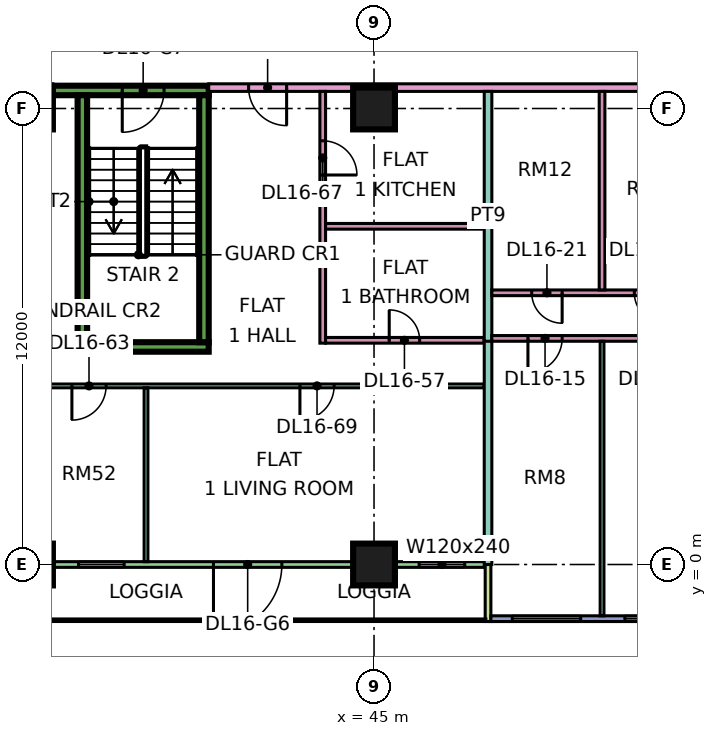
"""IFC4 building model, lengths in metres.
Left out: names, types, materials, properties, quantities, classifications, styles, units other than length and angle.
Written with IfcOpenShell. Run it as: python <this file> out.ifc"""

import sys

from ifc_helpers import new_model, si_unit, direction, frame, frame_2d, origin, origin_2d, place, context, subcontext, project, spatial, rectangle, extrude, element, fill, save


model = new_model("IFC4")
c1 = context("Model", 3, precision=1e-05, world=origin(), true_north=direction((0.0, 1.0)))
c2 = subcontext(c1, "Body", "Model", "MODEL_VIEW")
j1 = project(units=[si_unit("LENGTHUNIT", "METRE"), si_unit("PLANEANGLEUNIT", "RADIAN")], contexts=[c1])
p1 = place(None, origin())
s1 = spatial("IfcSite", under=j1, at=p1, CompositionType="ELEMENT")
p2 = place(p1, origin())
s2 = spatial("IfcBuilding", under=s1, at=p2, CompositionType="ELEMENT")
p3 = place(p2, frame((0.0, 0.0, 75.15)))
s3 = spatial("IfcBuildingStorey", under=s2, at=p3, CompositionType="ELEMENT", Elevation=75.15)
for number, where, z_axis, x_axis in (
    (1, (36.0, 0.0, 0.0), (0.0, 0.0, 1.0), (1.0, 0.0, 0.0)),
    (2, (36.0, 12.0, 0.0), (0.0, 0.0, 1.0), (1.0, 0.0, 0.0)),
    (3, (45.0, 0.0, 0.0), (0.0, 0.0, 1.0), (1.0, 0.0, 0.0)),
    (4, (45.0, 12.0, 0.0), (0.0, 0.0, 1.0), (1.0, 0.0, 0.0)),
):
    element("IfcColumn", number, at=place(p3, frame(where, z_axis=z_axis, x_axis=x_axis)), inside=s3, PredefinedType="COLUMN", context=c2, shape_type="SweptSolid", body=[
        extrude(rectangle(XDim=1.1, YDim=1.1, at=origin_2d()), origin(), (0.0, 0.0, 1.0), 3.75),
    ])
p4 = place(p3, frame((37.2, 5.725, 0.0), z_axis=(0.0, 0.0, 1.0), x_axis=(1.0, 0.0, 0.0)))
e5 = element("IfcWall", 5, at=p4, inside=s3, PredefinedType="SHEAR", context=c2, shape_type="SweptSolid", body=[
    extrude(rectangle(XDim=3.45, YDim=0.25, at=frame_2d((1.725, 0.0))), origin(), (0.0, 0.0, 1.0), 3.75),
])
p5 = place(p3, frame((36.55, 12.475, 0.0), z_axis=(0.0, 0.0, 1.0), x_axis=(1.0, 0.0, 0.0)))
e6 = element("IfcWall", 6, at=p5, inside=s3, PredefinedType="SHEAR", context=c2, shape_type="SweptSolid", body=[
    extrude(rectangle(XDim=4.1, YDim=0.25, at=frame_2d((2.05, 0.0))), origin(), (0.0, 0.0, 1.0), 3.75),
])
p6 = place(p5, frame((1.825, 0.0, 0.0)))
e7 = element("IfcOpeningElement", 7, at=p6, cuts=e6, PredefinedType="OPENING", context=c2, shape_type="SweptSolid", body=[
    extrude(rectangle(XDim=1.1, YDim=2.2, at=frame_2d((0.55, 1.1))), frame((0.0, 0.135, 0.0), z_axis=(0.0, -1.0, 0.0), x_axis=(1.0, 0.0, 0.0)), (0.0, 0.0, 1.0), 0.27),
])
for number, where, z_axis, x_axis in (
    (8, (37.325, 5.85, 0.0), (0.0, 0.0, 1.0), (0.0, 1.0, 0.0)),
    (9, (40.525, 5.85, 0.0), (0.0, 0.0, 1.0), (0.0, 1.0, 0.0)),
):
    element("IfcWall", number, at=place(p3, frame(where, z_axis=z_axis, x_axis=x_axis)), inside=s3, PredefinedType="SHEAR", context=c2, shape_type="SweptSolid", body=[
        extrude(rectangle(XDim=6.5, YDim=0.25, at=frame_2d((3.25, 0.0))), origin(), (0.0, 0.0, 1.0), 3.75),
    ])
p7 = place(p3, frame((36.075, 0.0, 0.0), z_axis=(0.0, 0.0, 1.0), x_axis=(1.0, 0.0, 0.0)))
e10 = element("IfcWall", 10, at=p7, inside=s3, PredefinedType="SOLIDWALL", context=c2, shape_type="SweptSolid", body=[
    extrude(rectangle(XDim=11.85, YDim=0.15, at=frame_2d((5.925, 0.0))), origin(), (0.0, 0.0, 1.0), 3.35),
])
p8 = place(p7, frame((1.15, 0.0, 0.45)))
e11 = element("IfcOpeningElement", 11, at=p8, cuts=e10, PredefinedType="OPENING", context=c2, shape_type="SweptSolid", body=[
    extrude(rectangle(XDim=1.2, YDim=2.4, at=frame_2d((0.6, 1.2))), frame((0.0, 0.085, 0.0), z_axis=(0.0, -1.0, 0.0), x_axis=(1.0, 0.0, 0.0)), (0.0, 0.0, 1.0), 0.17),
])
p9 = place(p7, frame((4.7, 0.0, 0.0)))
e12 = element("IfcOpeningElement", 12, at=p9, cuts=e10, PredefinedType="OPENING", context=c2, shape_type="SweptSolid", body=[
    extrude(rectangle(XDim=1.8, YDim=2.4, at=frame_2d((0.9, 1.2))), frame((0.0, 0.085, 0.0), z_axis=(0.0, -1.0, 0.0), x_axis=(1.0, 0.0, 0.0)), (0.0, 0.0, 1.0), 0.17),
])
p10 = place(p7, frame((10.113, 0.0, 0.45)))
e13 = element("IfcOpeningElement", 13, at=p10, cuts=e10, PredefinedType="OPENING", context=c2, shape_type="SweptSolid", body=[
    extrude(rectangle(XDim=1.2, YDim=2.4, at=frame_2d((0.6, 1.2))), frame((0.0, 0.085, 0.0), z_axis=(0.0, -1.0, 0.0), x_axis=(1.0, 0.0, 0.0)), (0.0, 0.0, 1.0), 0.17),
])
p11 = place(p3, frame((48.0, -1.5, 0.0), z_axis=(0.0, 0.0, 1.0), x_axis=(0.0, 1.0, 0.0)))
e14 = element("IfcWall", 14, at=p11, inside=s3, PredefinedType="SOLIDWALL", context=c2, shape_type="SweptSolid", body=[
    extrude(rectangle(XDim=1.5, YDim=0.15, at=frame_2d((0.75, 0.0))), origin(), (0.0, 0.0, 1.0), 3.35),
])
p12 = place(p3, frame((48.075, -1.425, 0.0), z_axis=(0.0, 0.0, 1.0), x_axis=(1.0, 0.0, 0.0)))
e15 = element("IfcWall", 15, at=p12, inside=s3, PredefinedType="SOLIDWALL", context=c2, shape_type="SweptSolid", body=[
    extrude(rectangle(XDim=11.85, YDim=0.15, at=frame_2d((5.925, 0.0))), origin(), (0.0, 0.0, 1.0), 3.35),
])
p13 = place(p12, frame((0.562, 0.0, 0.45)))
e16 = element("IfcOpeningElement", 16, at=p13, cuts=e15, PredefinedType="OPENING", context=c2, shape_type="SweptSolid", body=[
    extrude(rectangle(XDim=1.8, YDim=2.4, at=frame_2d((0.9, 1.2))), frame((0.0, 0.085, 0.0), z_axis=(0.0, -1.0, 0.0), x_axis=(1.0, 0.0, 0.0)), (0.0, 0.0, 1.0), 0.17),
])
p14 = place(p12, frame((3.525, 0.0, 0.45)))
e17 = element("IfcOpeningElement", 17, at=p14, cuts=e15, PredefinedType="OPENING", context=c2, shape_type="SweptSolid", body=[
    extrude(rectangle(XDim=1.8, YDim=2.4, at=frame_2d((0.9, 1.2))), frame((0.0, 0.085, 0.0), z_axis=(0.0, -1.0, 0.0), x_axis=(1.0, 0.0, 0.0)), (0.0, 0.0, 1.0), 0.17),
])
p15 = place(p12, frame((6.525, 0.0, 0.45)))
e18 = element("IfcOpeningElement", 18, at=p15, cuts=e15, PredefinedType="OPENING", context=c2, shape_type="SweptSolid", body=[
    extrude(rectangle(XDim=1.8, YDim=2.4, at=frame_2d((0.9, 1.2))), frame((0.0, 0.085, 0.0), z_axis=(0.0, -1.0, 0.0), x_axis=(1.0, 0.0, 0.0)), (0.0, 0.0, 1.0), 0.17),
])
p16 = place(p12, frame((9.488, 0.0, 0.45)))
e19 = element("IfcOpeningElement", 19, at=p16, cuts=e15, PredefinedType="OPENING", context=c2, shape_type="SweptSolid", body=[
    extrude(rectangle(XDim=1.8, YDim=2.4, at=frame_2d((0.9, 1.2))), frame((0.0, 0.085, 0.0), z_axis=(0.0, -1.0, 0.0), x_axis=(1.0, 0.0, 0.0)), (0.0, 0.0, 1.0), 0.17),
])
p17 = place(p3, frame((33.05, 4.7, 0.0), z_axis=(0.0, 0.0, 1.0), x_axis=(1.0, 0.0, 0.0)))
e20 = element("IfcWall", 20, at=p17, inside=s3, PredefinedType="PARTITIONING", context=c2, shape_type="SweptSolid", body=[
    extrude(rectangle(XDim=14.85, YDim=0.1, at=frame_2d((7.425, 0.0))), origin(), (0.0, 0.0, 1.0), 3.35),
])
p18 = place(p17, frame((1.0, 0.0, 0.0)))
e21 = element("IfcOpeningElement", 21, at=p18, cuts=e20, PredefinedType="OPENING", context=c2, shape_type="SweptSolid", body=[
    extrude(rectangle(XDim=0.9, YDim=2.1, at=frame_2d((0.45, 1.05))), frame((0.0, 0.06, 0.0), z_axis=(0.0, -1.0, 0.0), x_axis=(1.0, 0.0, 0.0)), (0.0, 0.0, 1.0), 0.12),
])
p19 = place(p17, frame((4.0, 0.0, 0.0)))
e22 = element("IfcOpeningElement", 22, at=p19, cuts=e20, PredefinedType="OPENING", context=c2, shape_type="SweptSolid", body=[
    extrude(rectangle(XDim=0.9, YDim=2.1, at=frame_2d((0.45, 1.05))), frame((0.0, 0.06, 0.0), z_axis=(0.0, -1.0, 0.0), x_axis=(1.0, 0.0, 0.0)), (0.0, 0.0, 1.0), 0.12),
])
p20 = place(p17, frame((10.0, 0.0, 0.0)))
e23 = element("IfcOpeningElement", 23, at=p20, cuts=e20, PredefinedType="OPENING", context=c2, shape_type="SweptSolid", body=[
    extrude(rectangle(XDim=0.9, YDim=2.1, at=frame_2d((0.45, 1.05))), frame((0.0, 0.06, 0.0), z_axis=(0.0, -1.0, 0.0), x_axis=(1.0, 0.0, 0.0)), (0.0, 0.0, 1.0), 0.12),
])
p21 = place(p3, frame((34.0, 12.55, 0.0), z_axis=(0.0, 0.0, 1.0), x_axis=(1.0, 0.0, 0.0)))
e24 = element("IfcWall", 24, at=p21, inside=s3, PredefinedType="PARTITIONING", context=c2, shape_type="SweptSolid", body=[
    extrude(rectangle(XDim=2.551, YDim=0.2, at=frame_2d((1.275, 0.0))), origin(), (0.0, 0.0, 1.0), 3.35),
])
p22 = place(p3, frame((39.0, 0.074, 0.0), z_axis=(0.0, 0.0, 1.0), x_axis=(0.0, 1.0, 0.0)))
e25 = element("IfcWall", 25, at=p22, inside=s3, PredefinedType="PARTITIONING", context=c2, shape_type="SweptSolid", body=[
    extrude(rectangle(XDim=4.576, YDim=0.1, at=frame_2d((2.288, 0.0))), origin(), (0.0, 0.0, 1.0), 3.35),
])
p23 = place(p3, frame((40.65, 12.55, 0.0), z_axis=(0.0, 0.0, 1.0), x_axis=(1.0, 0.0, 0.0)))
e26 = element("IfcWall", 26, at=p23, inside=s3, PredefinedType="PARTITIONING", context=c2, shape_type="SweptSolid", body=[
    extrude(rectangle(XDim=31.276, YDim=0.2, at=frame_2d((15.638, 0.0))), origin(), (0.0, 0.0, 1.0), 3.35),
])
p24 = place(p23, frame((23.1, 0.0, 0.0)))
e27 = element("IfcOpeningElement", 27, at=p24, cuts=e26, PredefinedType="OPENING", context=c2, shape_type="SweptSolid", body=[
    extrude(rectangle(XDim=1.0, YDim=2.1, at=frame_2d((0.5, 1.05))), frame((0.0, 0.11, 0.0), z_axis=(0.0, -1.0, 0.0), x_axis=(1.0, 0.0, 0.0)), (0.0, 0.0, 1.0), 0.22),
])
p25 = place(p23, frame((1.05, 0.0, 0.0)))
e28 = element("IfcOpeningElement", 28, at=p25, cuts=e26, PredefinedType="OPENING", context=c2, shape_type="SweptSolid", body=[
    extrude(rectangle(XDim=1.0, YDim=2.1, at=frame_2d((0.5, 1.05))), frame((0.0, 0.11, 0.0), z_axis=(0.0, -1.0, 0.0), x_axis=(1.0, 0.0, 0.0)), (0.0, 0.0, 1.0), 0.22),
])
p26 = place(p3, frame((43.65, 5.825, 0.0), z_axis=(0.0, 0.0, 1.0), x_axis=(0.0, 1.0, 0.0)))
e29 = element("IfcWall", 29, at=p26, inside=s3, PredefinedType="PARTITIONING", context=c2, shape_type="SweptSolid", body=[
    extrude(rectangle(XDim=6.625, YDim=0.15, at=frame_2d((3.312, 0.0))), origin(), (0.0, 0.0, 1.0), 3.35),
])
p27 = place(p26, frame((4.425, 0.0, 0.0)))
e30 = element("IfcOpeningElement", 30, at=p27, cuts=e29, PredefinedType="OPENING", context=c2, shape_type="SweptSolid", body=[
    extrude(rectangle(XDim=0.9, YDim=2.1, at=frame_2d((0.45, 1.05))), frame((0.0, 0.085, 0.0), z_axis=(0.0, -1.0, 0.0), x_axis=(1.0, 0.0, 0.0)), (0.0, 0.0, 1.0), 0.17),
])
p28 = place(p3, frame((43.725, 5.9, 0.0), z_axis=(0.0, 0.0, 1.0), x_axis=(1.0, 0.0, 0.0)))
e31 = element("IfcWall", 31, at=p28, inside=s3, PredefinedType="PARTITIONING", context=c2, shape_type="SweptSolid", body=[
    extrude(rectangle(XDim=4.175, YDim=0.15, at=frame_2d((2.087, 0.0))), origin(), (0.0, 0.0, 1.0), 3.35),
])
p29 = place(p28, frame((1.675, 0.0, 0.0)))
e32 = element("IfcOpeningElement", 32, at=p29, cuts=e31, PredefinedType="OPENING", context=c2, shape_type="SweptSolid", body=[
    extrude(rectangle(XDim=0.8, YDim=2.1, at=frame_2d((0.4, 1.05))), frame((0.0, 0.085, 0.0), z_axis=(0.0, -1.0, 0.0), x_axis=(1.0, 0.0, 0.0)), (0.0, 0.0, 1.0), 0.17),
])
p30 = place(p3, frame((43.725, 8.9, 0.0), z_axis=(0.0, 0.0, 1.0), x_axis=(1.0, 0.0, 0.0)))
e33 = element("IfcWall", 33, at=p30, inside=s3, PredefinedType="PARTITIONING", context=c2, shape_type="SweptSolid", body=[
    extrude(rectangle(XDim=4.175, YDim=0.15, at=frame_2d((2.087, 0.0))), origin(), (0.0, 0.0, 1.0), 3.35),
])
p31 = place(p3, frame((48.0, 0.0, 0.0), z_axis=(0.0, 0.0, 1.0), x_axis=(0.0, 1.0, 0.0)))
e34 = element("IfcWall", 34, at=p31, inside=s3, PredefinedType="PARTITIONING", context=c2, shape_type="SweptSolid", body=[
    extrude(rectangle(XDim=5.975, YDim=0.2, at=frame_2d((2.988, 0.0))), origin(), (0.0, 0.0, 1.0), 3.35),
])
p32 = place(p3, frame((48.0, 5.875, 0.0), z_axis=(0.0, 0.0, 1.0), x_axis=(0.0, 1.0, 0.0)))
e35 = element("IfcWall", 35, at=p32, inside=s3, PredefinedType="PARTITIONING", context=c2, shape_type="SweptSolid", body=[
    extrude(rectangle(XDim=6.575, YDim=0.2, at=frame_2d((3.288, 0.0))), origin(), (0.0, 0.0, 1.0), 3.35),
])
p33 = place(p3, frame((48.1, 5.95, 0.0), z_axis=(0.0, 0.0, 1.0), x_axis=(1.0, 0.0, 0.0)))
e36 = element("IfcWall", 36, at=p33, inside=s3, PredefinedType="PARTITIONING", context=c2, shape_type="SweptSolid", body=[
    extrude(rectangle(XDim=25.25, YDim=0.15, at=frame_2d((12.625, 0.0))), origin(), (0.0, 0.0, 1.0), 3.35),
])
p34 = place(p33, frame((0.95, 0.0, 0.0)))
e37 = element("IfcOpeningElement", 37, at=p34, cuts=e36, PredefinedType="OPENING", context=c2, shape_type="SweptSolid", body=[
    extrude(rectangle(XDim=0.9, YDim=2.1, at=frame_2d((0.45, 1.05))), frame((0.0, 0.085, 0.0), z_axis=(0.0, -1.0, 0.0), x_axis=(1.0, 0.0, 0.0)), (0.0, 0.0, 1.0), 0.17),
])
p35 = place(p33, frame((3.95, 0.0, 0.0)))
e38 = element("IfcOpeningElement", 38, at=p35, cuts=e36, PredefinedType="OPENING", context=c2, shape_type="SweptSolid", body=[
    extrude(rectangle(XDim=0.9, YDim=2.1, at=frame_2d((0.45, 1.05))), frame((0.0, 0.085, 0.0), z_axis=(0.0, -1.0, 0.0), x_axis=(1.0, 0.0, 0.0)), (0.0, 0.0, 1.0), 0.17),
])
p36 = place(p33, frame((6.95, 0.0, 0.0)))
e39 = element("IfcOpeningElement", 39, at=p36, cuts=e36, PredefinedType="OPENING", context=c2, shape_type="SweptSolid", body=[
    extrude(rectangle(XDim=0.9, YDim=2.1, at=frame_2d((0.45, 1.05))), frame((0.0, 0.085, 0.0), z_axis=(0.0, -1.0, 0.0), x_axis=(1.0, 0.0, 0.0)), (0.0, 0.0, 1.0), 0.17),
])
p37 = place(p33, frame((9.95, 0.0, 0.0)))
e40 = element("IfcOpeningElement", 40, at=p37, cuts=e36, PredefinedType="OPENING", context=c2, shape_type="SweptSolid", body=[
    extrude(rectangle(XDim=0.9, YDim=2.1, at=frame_2d((0.45, 1.05))), frame((0.0, 0.085, 0.0), z_axis=(0.0, -1.0, 0.0), x_axis=(1.0, 0.0, 0.0)), (0.0, 0.0, 1.0), 0.17),
])
p38 = place(p33, frame((17.45, 0.0, 0.0)))
e41 = element("IfcOpeningElement", 41, at=p38, cuts=e36, PredefinedType="OPENING", context=c2, shape_type="SweptSolid", body=[
    extrude(rectangle(XDim=0.9, YDim=2.1, at=frame_2d((0.45, 1.05))), frame((0.0, 0.085, 0.0), z_axis=(0.0, -1.0, 0.0), x_axis=(1.0, 0.0, 0.0)), (0.0, 0.0, 1.0), 0.17),
])
p39 = place(p33, frame((13.8, 0.0, 0.0)))
e42 = element("IfcOpeningElement", 42, at=p39, cuts=e36, PredefinedType="OPENING", context=c2, shape_type="SweptSolid", body=[
    extrude(rectangle(XDim=0.8, YDim=2.1, at=frame_2d((0.4, 1.05))), frame((0.0, 0.085, 0.0), z_axis=(0.0, -1.0, 0.0), x_axis=(1.0, 0.0, 0.0)), (0.0, 0.0, 1.0), 0.17),
])
p40 = place(p33, frame((21.65, 0.0, 0.0)))
e43 = element("IfcOpeningElement", 43, at=p40, cuts=e36, PredefinedType="OPENING", context=c2, shape_type="SweptSolid", body=[
    extrude(rectangle(XDim=1.6, YDim=2.1, at=frame_2d((0.8, 1.05))), frame((0.0, 0.085, 0.0), z_axis=(0.0, -1.0, 0.0), x_axis=(1.0, 0.0, 0.0)), (0.0, 0.0, 1.0), 0.17),
])
p41 = place(p3, frame((48.1, 7.15, 0.0), z_axis=(0.0, 0.0, 1.0), x_axis=(1.0, 0.0, 0.0)))
e44 = element("IfcWall", 44, at=p41, inside=s3, PredefinedType="PARTITIONING", context=c2, shape_type="SweptSolid", body=[
    extrude(rectangle(XDim=14.675, YDim=0.15, at=frame_2d((7.337, 0.0))), origin(), (0.0, 0.0, 1.0), 3.35),
])
p42 = place(p41, frame((3.75, 0.0, 0.0)))
e45 = element("IfcOpeningElement", 45, at=p42, cuts=e44, PredefinedType="OPENING", context=c2, shape_type="SweptSolid", body=[
    extrude(rectangle(XDim=0.8, YDim=2.1, at=frame_2d((0.4, 1.05))), frame((0.0, 0.085, 0.0), z_axis=(0.0, -1.0, 0.0), x_axis=(1.0, 0.0, 0.0)), (0.0, 0.0, 1.0), 0.17),
])
p43 = place(p41, frame((7.85, 0.0, 0.0)))
e46 = element("IfcOpeningElement", 46, at=p43, cuts=e44, PredefinedType="OPENING", context=c2, shape_type="SweptSolid", body=[
    extrude(rectangle(XDim=0.9, YDim=2.1, at=frame_2d((0.45, 1.05))), frame((0.0, 0.085, 0.0), z_axis=(0.0, -1.0, 0.0), x_axis=(1.0, 0.0, 0.0)), (0.0, 0.0, 1.0), 0.17),
])
p44 = place(p41, frame((1.05, 0.0, 0.0)))
e47 = element("IfcOpeningElement", 47, at=p44, cuts=e44, PredefinedType="OPENING", context=c2, shape_type="SweptSolid", body=[
    extrude(rectangle(XDim=0.8, YDim=2.1, at=frame_2d((0.4, 1.05))), frame((0.0, 0.085, 0.0), z_axis=(0.0, -1.0, 0.0), x_axis=(1.0, 0.0, 0.0)), (0.0, 0.0, 1.0), 0.17),
])
p45 = place(p3, frame((51.0, -1.351, 0.0), z_axis=(0.0, 0.0, 1.0), x_axis=(0.0, 1.0, 0.0)))
e48 = element("IfcWall", 48, at=p45, inside=s3, PredefinedType="PARTITIONING", context=c2, shape_type="SweptSolid", body=[
    extrude(rectangle(XDim=7.226, YDim=0.1, at=frame_2d((3.613, 0.0))), origin(), (0.0, 0.0, 1.0), 3.35),
])
p46 = place(p3, frame((51.0, 7.225, 0.0), z_axis=(0.0, 0.0, 1.0), x_axis=(0.0, 1.0, 0.0)))
e49 = element("IfcWall", 49, at=p46, inside=s3, PredefinedType="PARTITIONING", context=c2, shape_type="SweptSolid", body=[
    extrude(rectangle(XDim=5.225, YDim=0.15, at=frame_2d((2.612, 0.0))), origin(), (0.0, 0.0, 1.0), 3.35),
])
p47 = place(p8, origin())
e50 = element("IfcWindow", 50, at=p47, inside=s3, PartitioningType="SINGLE_PANEL", PredefinedType="WINDOW", context=c2, shape_type="SweptSolid", body=[
    extrude(rectangle(XDim=1.2, YDim=2.4, at=frame_2d((0.6, 1.2))), frame((0.0, 0.03, 0.0), z_axis=(0.0, -1.0, 0.0), x_axis=(1.0, 0.0, 0.0)), (0.0, 0.0, 1.0), 0.06),
])
fill(e11, e50)
p48 = place(p9, frame((1.8, 0.0, 0.0), z_axis=(0.0, 0.0, 1.0), x_axis=(-1.0, 0.0, 0.0)))
e51 = element("IfcDoor", 51, at=p48, inside=s3, OperationType="DOUBLE_DOOR_SINGLE_SWING", PredefinedType="DOOR", context=c2, shape_type="SweptSolid", body=[
    extrude(rectangle(XDim=1.8, YDim=2.4, at=frame_2d((0.9, 1.2))), frame((0.0, 0.025, 0.0), z_axis=(0.0, -1.0, 0.0), x_axis=(1.0, 0.0, 0.0)), (0.0, 0.0, 1.0), 0.05),
])
fill(e12, e51)
p49 = place(p10, origin())
e52 = element("IfcWindow", 52, at=p49, inside=s3, PartitioningType="SINGLE_PANEL", PredefinedType="WINDOW", context=c2, shape_type="SweptSolid", body=[
    extrude(rectangle(XDim=1.2, YDim=2.4, at=frame_2d((0.6, 1.2))), frame((0.0, 0.03, 0.0), z_axis=(0.0, -1.0, 0.0), x_axis=(1.0, 0.0, 0.0)), (0.0, 0.0, 1.0), 0.06),
])
fill(e13, e52)
p50 = place(p13, origin())
e53 = element("IfcWindow", 53, at=p50, inside=s3, PartitioningType="SINGLE_PANEL", PredefinedType="WINDOW", context=c2, shape_type="SweptSolid", body=[
    extrude(rectangle(XDim=1.8, YDim=2.4, at=frame_2d((0.9, 1.2))), frame((0.0, 0.03, 0.0), z_axis=(0.0, -1.0, 0.0), x_axis=(1.0, 0.0, 0.0)), (0.0, 0.0, 1.0), 0.06),
])
fill(e16, e53)
p51 = place(p14, origin())
e54 = element("IfcWindow", 54, at=p51, inside=s3, PartitioningType="SINGLE_PANEL", PredefinedType="WINDOW", context=c2, shape_type="SweptSolid", body=[
    extrude(rectangle(XDim=1.8, YDim=2.4, at=frame_2d((0.9, 1.2))), frame((0.0, 0.03, 0.0), z_axis=(0.0, -1.0, 0.0), x_axis=(1.0, 0.0, 0.0)), (0.0, 0.0, 1.0), 0.06),
])
fill(e17, e54)
p52 = place(p6, frame((1.1, 0.0, 0.0), z_axis=(0.0, 0.0, 1.0), x_axis=(-1.0, 0.0, 0.0)))
e55 = element("IfcDoor", 55, at=p52, inside=s3, OperationType="SINGLE_SWING_LEFT", PredefinedType="DOOR", context=c2, shape_type="SweptSolid", body=[
    extrude(rectangle(XDim=1.1, YDim=2.2, at=frame_2d((0.55, 1.1))), frame((0.0, 0.025, 0.0), z_axis=(0.0, -1.0, 0.0), x_axis=(1.0, 0.0, 0.0)), (0.0, 0.0, 1.0), 0.05),
])
fill(e7, e55)
p53 = place(p42, origin())
e56 = element("IfcDoor", 56, at=p53, inside=s3, OperationType="SINGLE_SWING_RIGHT", PredefinedType="DOOR", context=c2, shape_type="SweptSolid", body=[
    extrude(rectangle(XDim=0.8, YDim=2.1, at=frame_2d((0.4, 1.05))), frame((0.0, 0.025, 0.0), z_axis=(0.0, -1.0, 0.0), x_axis=(1.0, 0.0, 0.0)), (0.0, 0.0, 1.0), 0.05),
])
fill(e45, e56)
p54 = place(p34, frame((0.9, 0.0, 0.0), z_axis=(0.0, 0.0, 1.0), x_axis=(-1.0, 0.0, 0.0)))
e57 = element("IfcDoor", 57, at=p54, inside=s3, OperationType="SINGLE_SWING_LEFT", PredefinedType="DOOR", context=c2, shape_type="SweptSolid", body=[
    extrude(rectangle(XDim=0.9, YDim=2.1, at=frame_2d((0.45, 1.05))), frame((0.0, 0.025, 0.0), z_axis=(0.0, -1.0, 0.0), x_axis=(1.0, 0.0, 0.0)), (0.0, 0.0, 1.0), 0.05),
])
fill(e37, e57)
p55 = place(p44, origin())
e58 = element("IfcDoor", 58, at=p55, inside=s3, OperationType="SINGLE_SWING_RIGHT", PredefinedType="DOOR", context=c2, shape_type="SweptSolid", body=[
    extrude(rectangle(XDim=0.8, YDim=2.1, at=frame_2d((0.4, 1.05))), frame((0.0, 0.025, 0.0), z_axis=(0.0, -1.0, 0.0), x_axis=(1.0, 0.0, 0.0)), (0.0, 0.0, 1.0), 0.05),
])
fill(e47, e58)
p56 = place(p29, origin())
e59 = element("IfcDoor", 59, at=p56, inside=s3, OperationType="SINGLE_SWING_LEFT", PredefinedType="DOOR", context=c2, shape_type="SweptSolid", body=[
    extrude(rectangle(XDim=0.8, YDim=2.1, at=frame_2d((0.4, 1.05))), frame((0.0, 0.025, 0.0), z_axis=(0.0, -1.0, 0.0), x_axis=(1.0, 0.0, 0.0)), (0.0, 0.0, 1.0), 0.05),
])
fill(e32, e59)
p57 = place(p19, frame((0.9, 0.0, 0.0), z_axis=(0.0, 0.0, 1.0), x_axis=(-1.0, 0.0, 0.0)))
e60 = element("IfcDoor", 60, at=p57, inside=s3, OperationType="SINGLE_SWING_LEFT", PredefinedType="DOOR", context=c2, shape_type="SweptSolid", body=[
    extrude(rectangle(XDim=0.9, YDim=2.1, at=frame_2d((0.45, 1.05))), frame((0.0, 0.025, 0.0), z_axis=(0.0, -1.0, 0.0), x_axis=(1.0, 0.0, 0.0)), (0.0, 0.0, 1.0), 0.05),
])
fill(e22, e60)
p58 = place(p25, origin())
e61 = element("IfcDoor", 61, at=p58, inside=s3, OperationType="SINGLE_SWING_RIGHT", PredefinedType="DOOR", context=c2, shape_type="SweptSolid", body=[
    extrude(rectangle(XDim=1.0, YDim=2.1, at=frame_2d((0.5, 1.05))), frame((0.0, 0.025, 0.0), z_axis=(0.0, -1.0, 0.0), x_axis=(1.0, 0.0, 0.0)), (0.0, 0.0, 1.0), 0.05),
])
fill(e28, e61)
p59 = place(p27, frame((0.9, 0.0, 0.0), z_axis=(0.0, 0.0, 1.0), x_axis=(-1.0, 0.0, 0.0)))
e62 = element("IfcDoor", 62, at=p59, inside=s3, OperationType="SINGLE_SWING_LEFT", PredefinedType="DOOR", context=c2, shape_type="SweptSolid", body=[
    extrude(rectangle(XDim=0.9, YDim=2.1, at=frame_2d((0.45, 1.05))), frame((0.0, 0.025, 0.0), z_axis=(0.0, -1.0, 0.0), x_axis=(1.0, 0.0, 0.0)), (0.0, 0.0, 1.0), 0.05),
])
fill(e30, e62)
p60 = place(p20, frame((0.9, 0.0, 0.0), z_axis=(0.0, 0.0, 1.0), x_axis=(-1.0, 0.0, 0.0)))
e63 = element("IfcDoor", 63, at=p60, inside=s3, OperationType="SINGLE_SWING_LEFT", PredefinedType="DOOR", context=c2, shape_type="SweptSolid", body=[
    extrude(rectangle(XDim=0.9, YDim=2.1, at=frame_2d((0.45, 1.05))), frame((0.0, 0.025, 0.0), z_axis=(0.0, -1.0, 0.0), x_axis=(1.0, 0.0, 0.0)), (0.0, 0.0, 1.0), 0.05),
])
fill(e23, e63)
save(model, sys.argv[1])
